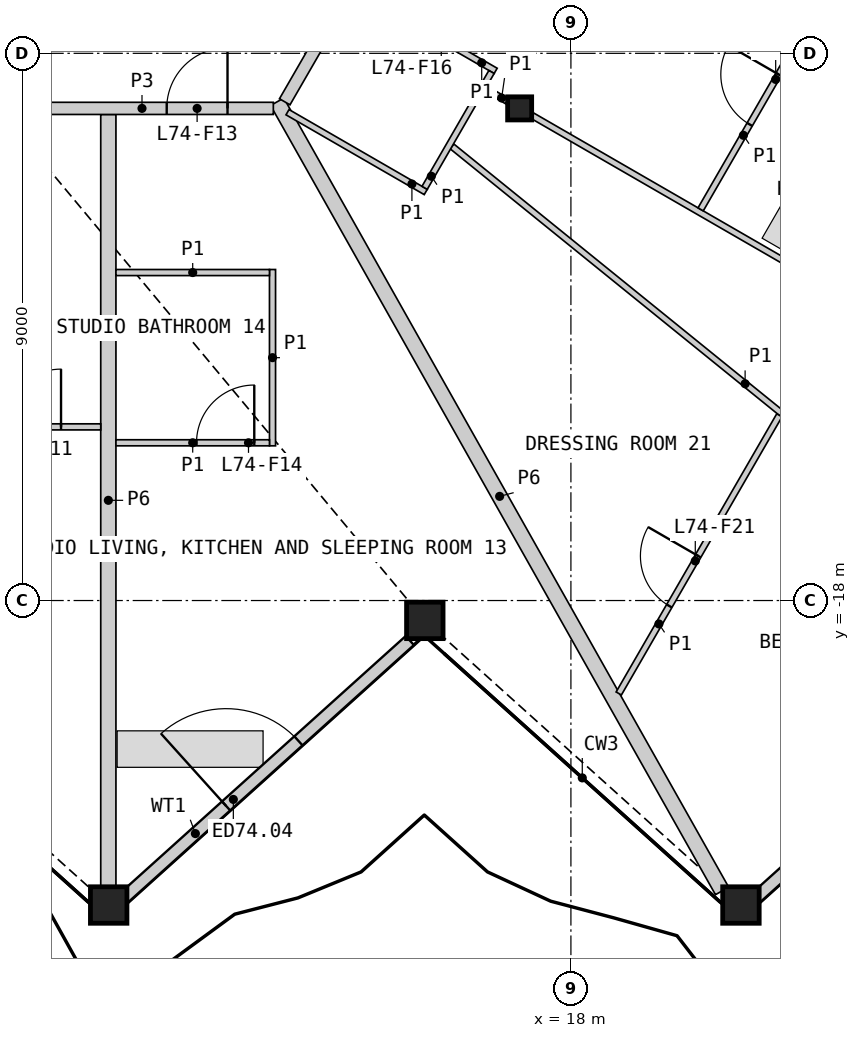
"""IFC4 building model, lengths in metres.
Left out: names, types, materials, properties, quantities, classifications, styles, units other than length and angle.
Written with IfcOpenShell. Run it as: python <this file> out.ifc"""

import sys

from ifc_helpers import new_model, si_unit, direction, frame, frame_2d, origin, origin_2d, place, context, subcontext, project, spatial, rectangle, hollow_rectangle, i_section, extrude, element, fill, save


model = new_model("IFC4")
c1 = context("Model", 3, precision=1e-05, world=origin(), true_north=direction((0.0, 1.0)))
c2 = subcontext(c1, "Body", "Model", "MODEL_VIEW")
j1 = project(units=[si_unit("LENGTHUNIT", "METRE"), si_unit("PLANEANGLEUNIT", "RADIAN")], contexts=[c1])
p1 = place(None, origin())
s1 = spatial("IfcSite", under=j1, at=p1, CompositionType="ELEMENT")
p2 = place(p1, origin())
s2 = spatial("IfcBuilding", under=s1, at=p2, CompositionType="ELEMENT")
p3 = place(p2, frame((0.0, 0.0, 332.4)))
s3 = spatial("IfcBuildingStorey", under=s2, at=p3, CompositionType="ELEMENT", Elevation=332.4)
for number, where, z_axis, x_axis in (
    (1, (10.398, -23.008, 0.0), (0.0, 0.0, 1.0), (1.0, 0.0, 0.0)),
    (2, (15.597, -18.327, 0.0), (0.0, 0.0, 1.0), (1.0, 0.0, 0.0)),
    (3, (20.796, -23.008, 0.0), (0.0, 0.0, 1.0), (1.0, 0.0, 0.0)),
):
    element("IfcColumn", number, at=place(p3, frame(where, z_axis=z_axis, x_axis=x_axis)), inside=s3, PredefinedType="COLUMN", context=c2, shape_type="SweptSolid", body=[
        extrude(hollow_rectangle(XDim=0.6, YDim=0.6, WallThickness=0.04, at=origin_2d()), origin(), (0.0, 0.0, 1.0), 3.4),
    ])
p4 = place(p3, frame((17.157, -9.906, 0.0), z_axis=(0.0, 0.0, 1.0), x_axis=(1.0, 0.0, 0.0)))
e4 = element("IfcColumn", 4, at=p4, inside=s3, PredefinedType="COLUMN", context=c2, shape_type="SweptSolid", body=[
    extrude(i_section(OverallWidth=0.396, OverallDepth=0.381, WebThickness=0.019, FlangeThickness=0.03, at=origin_2d()), origin(), (0.0, 0.0, 1.0), 3.4),
])
p5 = place(p3, frame((10.648, -22.892, 0.0), z_axis=(0.0, 0.0, 1.0), x_axis=(0.743136819733, 0.669139497532, 0.0)))
e5 = element("IfcWall", 5, at=p5, inside=s3, PredefinedType="SOLIDWALL", context=c2, shape_type="SweptSolid", body=[
    extrude(rectangle(XDim=6.328, YDim=0.2, at=frame_2d((3.164, 0.0))), origin(), (0.0, 0.0, 1.0), 2.488),
])
p6 = place(p5, frame((2.262, 0.0, 0.0)))
e6 = element("IfcOpeningElement", 6, at=p6, cuts=e5, PredefinedType="OPENING", context=c2, shape_type="SweptSolid", body=[
    extrude(rectangle(XDim=1.6, YDim=2.25, at=frame_2d((0.8, 1.125))), frame((0.0, 0.11, 0.0), z_axis=(0.0, -1.0, 0.0), x_axis=(1.0, 0.0, 0.0)), (0.0, 0.0, 1.0), 0.22),
])
p7 = place(p3, frame((21.041, -22.892, 0.0), z_axis=(0.0, 0.0, 1.0), x_axis=(0.743129180176, 0.669147981818, 0.0)))
e7 = element("IfcWall", 7, at=p7, inside=s3, PredefinedType="SOLIDWALL", context=c2, shape_type="SweptSolid", body=[
    extrude(rectangle(XDim=6.33, YDim=0.2, at=frame_2d((3.165, 0.0))), origin(), (0.0, 0.0, 1.0), 2.488),
])
p8 = place(p7, frame((2.262, 0.0, 0.0)))
e8 = element("IfcOpeningElement", 8, at=p8, cuts=e7, PredefinedType="OPENING", context=c2, shape_type="SweptSolid", body=[
    extrude(rectangle(XDim=1.6, YDim=2.25, at=frame_2d((0.8, 1.125))), frame((0.0, 0.11, 0.0), z_axis=(0.0, -1.0, 0.0), x_axis=(1.0, 0.0, 0.0)), (0.0, 0.0, 1.0), 0.22),
])
p9 = place(p3, frame((13.169, -9.797, 0.0), z_axis=(0.0, 0.0, 1.0), x_axis=(0.4910591841, -0.871126212274, 0.0)))
e9 = element("IfcWall", 9, at=p9, inside=s3, PredefinedType="PARTITIONING", context=c2, shape_type="SweptSolid", body=[
    extrude(rectangle(XDim=14.9, YDim=0.25, at=frame_2d((7.45, 0.0))), origin(), (0.0, 0.0, 1.0), 2.33),
])
p10 = place(p3, frame((10.393, -22.698, 0.0), z_axis=(0.0, 0.0, 1.0), x_axis=(0.0, 1.0, 0.0)))
e10 = element("IfcWall", 10, at=p10, inside=s3, PredefinedType="PARTITIONING", context=c2, shape_type="SweptSolid", body=[
    extrude(rectangle(XDim=12.692, YDim=0.25, at=frame_2d((6.346, 0.0))), origin(), (0.0, 0.0, 1.0), 2.33),
])
p11 = place(p3, frame((8.786, -9.906, 0.0), z_axis=(0.0, 0.0, 1.0), x_axis=(1.0, 0.0, 0.0)))
e11 = element("IfcWall", 11, at=p11, inside=s3, PredefinedType="PARTITIONING", context=c2, shape_type="SweptSolid", body=[
    extrude(rectangle(XDim=4.32, YDim=0.2, at=frame_2d((2.16, 0.0))), origin(), (0.0, 0.0, 1.0), 3.1),
])
p12 = place(p11, frame((2.566, 0.0, 0.0)))
e12 = element("IfcOpeningElement", 12, at=p12, cuts=e11, PredefinedType="OPENING", context=c2, shape_type="SweptSolid", body=[
    extrude(rectangle(XDim=1.0, YDim=2.1, at=frame_2d((0.5, 1.05))), frame((0.0, 0.11, 0.0), z_axis=(0.0, -1.0, 0.0), x_axis=(1.0, 0.0, 0.0)), (0.0, 0.0, 1.0), 0.22),
])
p13 = place(p3, frame((13.293, -9.797, 0.0), z_axis=(0.0, 0.0, 1.0), x_axis=(0.499967746641, 0.866044024469, 0.0)))
e13 = element("IfcWall", 13, at=p13, inside=s3, PredefinedType="PARTITIONING", context=c2, shape_type="SweptSolid", body=[
    extrude(rectangle(XDim=3.676, YDim=0.2, at=frame_2d((1.838, 0.0))), origin(), (0.0, 0.0, 1.0), 3.1),
])
p14 = place(p13, frame((2.426, 0.0, 0.0)))
e14 = element("IfcOpeningElement", 14, at=p14, cuts=e13, PredefinedType="OPENING", context=c2, shape_type="SweptSolid", body=[
    extrude(rectangle(XDim=1.0, YDim=2.1, at=frame_2d((0.5, 1.05))), frame((0.0, 0.11, 0.0), z_axis=(0.0, -1.0, 0.0), x_axis=(1.0, 0.0, 0.0)), (0.0, 0.0, 1.0), 0.22),
])
p15 = place(p3, frame((16.044, -10.531, 0.0), z_axis=(0.0, 0.0, 1.0), x_axis=(0.777141742697, -0.629325600749, 0.0)))
e15 = element("IfcWall", 15, at=p15, inside=s3, PredefinedType="PARTITIONING", context=c2, shape_type="SweptSolid", body=[
    extrude(rectangle(XDim=12.406, YDim=0.1, at=frame_2d((6.203, 0.0))), origin(), (0.0, 0.0, 1.0), 2.33),
])
p16 = place(p15, frame((7.185, 0.0, 0.0)))
e16 = element("IfcOpeningElement", 16, at=p16, cuts=e15, PredefinedType="OPENING", context=c2, shape_type="SweptSolid", body=[
    extrude(rectangle(XDim=0.95, YDim=2.1, at=frame_2d((0.475, 1.05))), frame((0.0, 0.06, 0.0), z_axis=(0.0, -1.0, 0.0), x_axis=(1.0, 0.0, 0.0)), (0.0, 0.0, 1.0), 0.12),
])
p17 = place(p3, frame((17.365, -10.025, 0.0), z_axis=(0.0, 0.0, 1.0), x_axis=(0.866021046153, -0.500007547564, 0.0)))
e17 = element("IfcWall", 17, at=p17, inside=s3, PredefinedType="PARTITIONING", context=c2, shape_type="SweptSolid", body=[
    extrude(rectangle(XDim=11.267, YDim=0.1, at=frame_2d((5.634, 0.0))), origin(), (0.0, 0.0, 1.0), 2.33),
])
p18 = place(p17, frame((8.264, 0.0, 0.0)))
e18 = element("IfcOpeningElement", 18, at=p18, cuts=e17, PredefinedType="OPENING", context=c2, shape_type="SweptSolid", body=[
    extrude(rectangle(XDim=0.95, YDim=2.1, at=frame_2d((0.475, 1.05))), frame((0.0, 0.06, 0.0), z_axis=(0.0, -1.0, 0.0), x_axis=(1.0, 0.0, 0.0)), (0.0, 0.0, 1.0), 0.12),
])
p19 = place(p3, frame((0.05, -15.144, 0.0), z_axis=(0.0, 0.0, 1.0), x_axis=(1.0, 0.0, 0.0)))
e19 = element("IfcWall", 19, at=p19, inside=s3, PredefinedType="PARTITIONING", context=c2, shape_type="SweptSolid", body=[
    extrude(rectangle(XDim=10.218, YDim=0.1, at=frame_2d((5.109, 0.0))), origin(), (0.0, 0.0, 1.0), 2.33),
])
p20 = place(p19, frame((0.855, 0.0, 0.0)))
e20 = element("IfcOpeningElement", 20, at=p20, cuts=e19, PredefinedType="OPENING", context=c2, shape_type="SweptSolid", body=[
    extrude(rectangle(XDim=0.95, YDim=2.1, at=frame_2d((0.475, 1.05))), frame((0.0, 0.06, 0.0), z_axis=(0.0, -1.0, 0.0), x_axis=(1.0, 0.0, 0.0)), (0.0, 0.0, 1.0), 0.12),
])
p21 = place(p19, frame((8.615, 0.0, 0.0)))
e21 = element("IfcOpeningElement", 21, at=p21, cuts=e19, PredefinedType="OPENING", context=c2, shape_type="SweptSolid", body=[
    extrude(rectangle(XDim=0.95, YDim=2.1, at=frame_2d((0.475, 1.05))), frame((0.0, 0.06, 0.0), z_axis=(0.0, -1.0, 0.0), x_axis=(1.0, 0.0, 0.0)), (0.0, 0.0, 1.0), 0.12),
])
p22 = place(p3, frame((18.787, -19.529, 0.0), z_axis=(0.0, 0.0, 1.0), x_axis=(0.499986503906, 0.866033195618, 0.0)))
e22 = element("IfcWall", 22, at=p22, inside=s3, PredefinedType="PARTITIONING", context=c2, shape_type="SweptSolid", body=[
    extrude(rectangle(XDim=5.282, YDim=0.1, at=frame_2d((2.641, 0.0))), origin(), (0.0, 0.0, 1.0), 2.33),
])
p23 = place(p22, frame((1.662, 0.0, 0.0)))
e23 = element("IfcOpeningElement", 23, at=p23, cuts=e22, PredefinedType="OPENING", context=c2, shape_type="SweptSolid", body=[
    extrude(rectangle(XDim=0.95, YDim=2.1, at=frame_2d((0.475, 1.05))), frame((0.0, 0.06, 0.0), z_axis=(0.0, -1.0, 0.0), x_axis=(1.0, 0.0, 0.0)), (0.0, 0.0, 1.0), 0.12),
])
p24 = place(p3, frame((20.134, -11.566, 0.0), z_axis=(0.0, 0.0, 1.0), x_axis=(0.499947857008, 0.866055506462, 0.0)))
e24 = element("IfcWall", 24, at=p24, inside=s3, PredefinedType="PARTITIONING", context=c2, shape_type="SweptSolid", body=[
    extrude(rectangle(XDim=2.813, YDim=0.1, at=frame_2d((1.406, 0.0))), origin(), (0.0, 0.0, 1.0), 2.33),
])
p25 = place(p24, frame((1.613, 0.0, 0.0)))
e25 = element("IfcOpeningElement", 25, at=p25, cuts=e24, PredefinedType="OPENING", context=c2, shape_type="SweptSolid", body=[
    extrude(rectangle(XDim=0.95, YDim=2.1, at=frame_2d((0.475, 1.05))), frame((0.0, 0.06, 0.0), z_axis=(0.0, -1.0, 0.0), x_axis=(1.0, 0.0, 0.0)), (0.0, 0.0, 1.0), 0.12),
])
p26 = place(p3, frame((13.093, -15.456, 0.0), z_axis=(0.0, 0.0, 1.0), x_axis=(0.0, 1.0, 0.0)))
e26 = element("IfcWall", 26, at=p26, inside=s3, PredefinedType="PARTITIONING", context=c2, shape_type="SweptSolid", body=[
    extrude(rectangle(XDim=2.9, YDim=0.1, at=frame_2d((1.45, 0.0))), origin(), (0.0, 0.0, 1.0), 2.33),
])
p27 = place(p3, frame((10.518, -12.606, 0.0), z_axis=(0.0, 0.0, 1.0), x_axis=(1.0, 0.0, 0.0)))
e27 = element("IfcWall", 27, at=p27, inside=s3, PredefinedType="PARTITIONING", context=c2, shape_type="SweptSolid", body=[
    extrude(rectangle(XDim=2.525, YDim=0.1, at=frame_2d((1.262, 0.0))), origin(), (0.0, 0.0, 1.0), 2.33),
])
p28 = place(p3, frame((10.518, -15.406, 0.0), z_axis=(0.0, 0.0, 1.0), x_axis=(1.0, 0.0, 0.0)))
e28 = element("IfcWall", 28, at=p28, inside=s3, PredefinedType="PARTITIONING", context=c2, shape_type="SweptSolid", body=[
    extrude(rectangle(XDim=2.525, YDim=0.1, at=frame_2d((1.262, 0.0))), origin(), (0.0, 0.0, 1.0), 2.33),
])
p29 = place(p28, frame((1.325, 0.0, 0.0)))
e29 = element("IfcOpeningElement", 29, at=p29, cuts=e28, PredefinedType="OPENING", context=c2, shape_type="SweptSolid", body=[
    extrude(rectangle(XDim=0.95, YDim=2.1, at=frame_2d((0.475, 1.05))), frame((0.0, 0.06, 0.0), z_axis=(0.0, -1.0, 0.0), x_axis=(1.0, 0.0, 0.0)), (0.0, 0.0, 1.0), 0.12),
])
p30 = place(p3, frame((14.468, -7.964, 0.0), z_axis=(0.0, 0.0, 1.0), x_axis=(0.865989200783, -0.500062700197, 0.0)))
e30 = element("IfcWall", 30, at=p30, inside=s3, PredefinedType="PARTITIONING", context=c2, shape_type="SweptSolid", body=[
    extrude(rectangle(XDim=2.65, YDim=0.1, at=frame_2d((1.325, 0.0))), origin(), (0.0, 0.0, 1.0), 2.33),
])
p31 = place(p30, frame((0.905, 0.0, 0.0)))
e31 = element("IfcOpeningElement", 31, at=p31, cuts=e30, PredefinedType="OPENING", context=c2, shape_type="SweptSolid", body=[
    extrude(rectangle(XDim=0.95, YDim=2.1, at=frame_2d((0.475, 1.05))), frame((0.0, 0.06, 0.0), z_axis=(0.0, -1.0, 0.0), x_axis=(1.0, 0.0, 0.0)), (0.0, 0.0, 1.0), 0.12),
])
p32 = place(p3, frame((13.339, -9.968, 0.0), z_axis=(0.0, 0.0, 1.0), x_axis=(0.866036909293, -0.499980071345, 0.0)))
e32 = element("IfcWall", 32, at=p32, inside=s3, PredefinedType="PARTITIONING", context=c2, shape_type="SweptSolid", body=[
    extrude(rectangle(XDim=2.625, YDim=0.1, at=frame_2d((1.312, 0.0))), origin(), (0.0, 0.0, 1.0), 2.33),
])
p33 = place(p3, frame((15.594, -11.212, 0.0), z_axis=(0.0, 0.0, 1.0), x_axis=(0.499898558967, 0.866083962871, 0.0)))
e33 = element("IfcWall", 33, at=p33, inside=s3, PredefinedType="PARTITIONING", context=c2, shape_type="SweptSolid", body=[
    extrude(rectangle(XDim=2.2, YDim=0.1, at=frame_2d((1.1, 0.0))), origin(), (0.0, 0.0, 1.0), 2.33),
])
p34 = place(p3, frame((16.594, -9.581, 0.0), z_axis=(0.0, 0.0, 1.0), x_axis=(0.866036909293, -0.499980071345, 0.0)))
e34 = element("IfcWall", 34, at=p34, inside=s3, PredefinedType="PARTITIONING", context=c2, shape_type="SweptSolid", body=[
    extrude(rectangle(XDim=0.41, YDim=0.1, at=frame_2d((0.205, 0.0))), origin(), (0.0, 0.0, 1.0), 2.33),
])
p35 = place(p6, origin())
e35 = element("IfcDoor", 35, at=p35, inside=s3, OperationType="DOUBLE_DOOR_SINGLE_SWING", PredefinedType="DOOR", context=c2, shape_type="SweptSolid", body=[
    extrude(rectangle(XDim=1.6, YDim=2.25, at=frame_2d((0.8, 1.125))), frame((0.0, 0.025, 0.0), z_axis=(0.0, -1.0, 0.0), x_axis=(1.0, 0.0, 0.0)), (0.0, 0.0, 1.0), 0.05),
])
fill(e6, e35)
p36 = place(p21, origin())
e36 = element("IfcDoor", 36, at=p36, inside=s3, OperationType="SINGLE_SWING_RIGHT", PredefinedType="DOOR", context=c2, shape_type="SweptSolid", body=[
    extrude(rectangle(XDim=0.95, YDim=2.1, at=frame_2d((0.475, 1.05))), frame((0.0, 0.025, 0.0), z_axis=(0.0, -1.0, 0.0), x_axis=(1.0, 0.0, 0.0)), (0.0, 0.0, 1.0), 0.05),
])
fill(e21, e36)
p37 = place(p12, origin())
e37 = element("IfcDoor", 37, at=p37, inside=s3, OperationType="SINGLE_SWING_RIGHT", PredefinedType="DOOR", context=c2, shape_type="SweptSolid", body=[
    extrude(rectangle(XDim=1.0, YDim=2.1, at=frame_2d((0.5, 1.05))), frame((0.0, 0.025, 0.0), z_axis=(0.0, -1.0, 0.0), x_axis=(1.0, 0.0, 0.0)), (0.0, 0.0, 1.0), 0.05),
])
fill(e12, e37)
p38 = place(p29, origin())
e38 = element("IfcDoor", 38, at=p38, inside=s3, OperationType="SINGLE_SWING_RIGHT", PredefinedType="DOOR", context=c2, shape_type="SweptSolid", body=[
    extrude(rectangle(XDim=0.95, YDim=2.1, at=frame_2d((0.475, 1.05))), frame((0.0, 0.025, 0.0), z_axis=(0.0, -1.0, 0.0), x_axis=(1.0, 0.0, 0.0)), (0.0, 0.0, 1.0), 0.05),
])
fill(e29, e38)
p39 = place(p25, origin())
e39 = element("IfcDoor", 39, at=p39, inside=s3, OperationType="SINGLE_SWING_RIGHT", PredefinedType="DOOR", context=c2, shape_type="SweptSolid", body=[
    extrude(rectangle(XDim=0.95, YDim=2.1, at=frame_2d((0.475, 1.05))), frame((0.0, 0.025, 0.0), z_axis=(0.0, -1.0, 0.0), x_axis=(1.0, 0.0, 0.0)), (0.0, 0.0, 1.0), 0.05),
])
fill(e25, e39)
p40 = place(p23, origin())
e40 = element("IfcDoor", 40, at=p40, inside=s3, OperationType="SINGLE_SWING_RIGHT", PredefinedType="DOOR", context=c2, shape_type="SweptSolid", body=[
    extrude(rectangle(XDim=0.95, YDim=2.1, at=frame_2d((0.475, 1.05))), frame((0.0, 0.025, 0.0), z_axis=(0.0, -1.0, 0.0), x_axis=(1.0, 0.0, 0.0)), (0.0, 0.0, 1.0), 0.05),
])
fill(e23, e40)
save(model, sys.argv[1])
